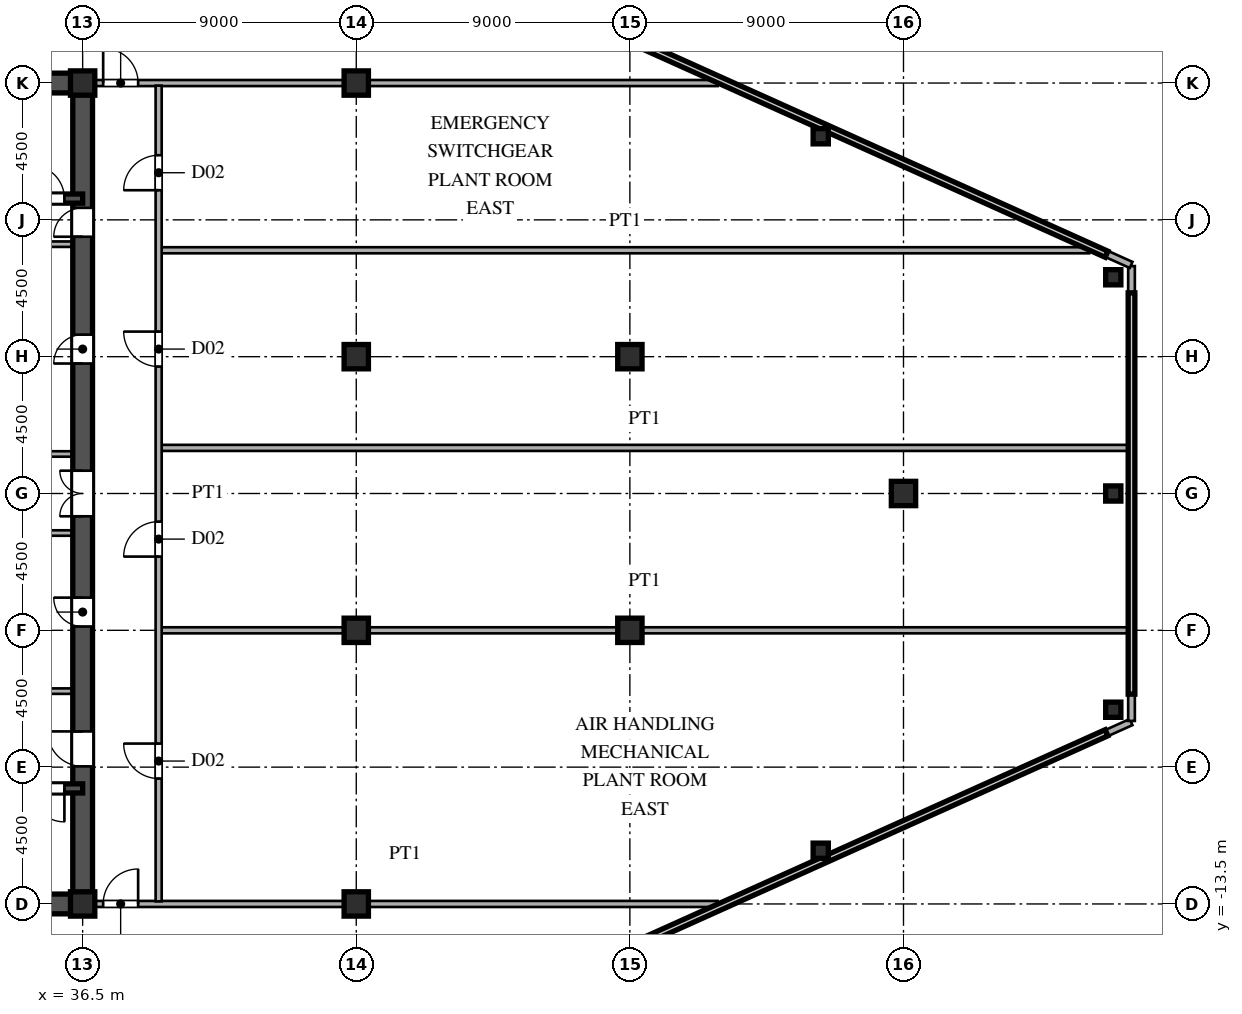
"""IFC4 building model, lengths in metres.
Left out: names, types, materials, properties, quantities, classifications, styles, units other than length and angle.
Written with IfcOpenShell. Run it as: python <this file> out.ifc"""

import sys

from ifc_helpers import new_model, si_unit, direction, frame, frame_2d, origin, origin_2d, place, context, subcontext, project, spatial, rectangle, hollow_rectangle, i_section, extrude, source, transform, mapped, element, fill, save


model = new_model("IFC4")
c1 = context("Model", 3, precision=1e-05, world=origin(), true_north=direction((0.0, 1.0)))
c2 = subcontext(c1, "Body", "Model", "MODEL_VIEW")
j1 = project(units=[si_unit("LENGTHUNIT", "METRE"), si_unit("PLANEANGLEUNIT", "RADIAN")], contexts=[c1])
p1 = place(None, origin())
s1 = spatial("IfcSite", under=j1, at=p1, CompositionType="ELEMENT")
p2 = place(p1, origin())
s2 = spatial("IfcBuilding", under=s1, at=p2, CompositionType="ELEMENT")
p3 = place(p2, frame((0.0, 0.0, 87.3)))
s3 = spatial("IfcBuildingStorey", under=s2, at=p3, CompositionType="ELEMENT", Elevation=87.3)
m1 = source(origin(), c2, "Body", "SweptSolid", [
    extrude(i_section(OverallWidth=0.8, OverallDepth=0.8, WebThickness=0.032, FlangeThickness=0.05, at=origin_2d()), origin(), (0.0, 0.0, 1.0), 5.1),
])
for number, where, z_axis, x_axis in (
    (1, (36.5, -13.5, 0.0), (0.0, 0.0, 1.0), (1.0, 0.0, 0.0)),
    (2, (36.5, 13.5, 0.0), (0.0, 0.0, 1.0), (1.0, 0.0, 0.0)),
    (3, (45.5, -13.5, 0.0), (0.0, 0.0, 1.0), (1.0, 0.0, 0.0)),
    (4, (45.5, -4.5, 0.0), (0.0, 0.0, 1.0), (1.0, 0.0, 0.0)),
    (5, (45.5, 4.5, 0.0), (0.0, 0.0, 1.0), (1.0, 0.0, 0.0)),
    (6, (45.5, 13.5, 0.0), (0.0, 0.0, 1.0), (1.0, 0.0, 0.0)),
    (7, (54.5, -4.5, 0.0), (0.0, 0.0, 1.0), (1.0, 0.0, 0.0)),
    (8, (54.5, 4.5, 0.0), (0.0, 0.0, 1.0), (1.0, 0.0, 0.0)),
    (9, (63.5, 0.0, 0.0), (0.0, 0.0, 1.0), (1.0, 0.0, 0.0)),
):
    element("IfcColumn", number, at=place(p3, frame(where, z_axis=z_axis, x_axis=x_axis)), inside=s3, PredefinedType="COLUMN", context=c2, shape_type="MappedRepresentation", body=[
        mapped(m1, transform((0.0, 0.0, 0.0), scale=1.0)),
    ])
m2 = source(origin(), c2, "Body", "SweptSolid", [
    extrude(hollow_rectangle(XDim=0.5, YDim=0.5, WallThickness=0.02, at=origin_2d()), origin(), (0.0, 0.0, 1.0), 5.1),
])
for number, where, z_axis, x_axis in (
    (10, (70.4, -7.112, 0.0), (0.0, 0.0, 1.0), (1.0, 0.0, 0.0)),
    (11, (70.4, 7.112, 0.0), (0.0, 0.0, 1.0), (1.0, 0.0, 0.0)),
    (12, (60.778, -11.749, 0.0), (0.0, 0.0, 1.0), (1.0, 0.0, 0.0)),
    (13, (60.778, 11.749, 0.0), (0.0, 0.0, 1.0), (1.0, 0.0, 0.0)),
    (14, (70.4, 0.0, 0.0), (0.0, 0.0, 1.0), (1.0, 0.0, 0.0)),
):
    element("IfcColumn", number, at=place(p3, frame(where, z_axis=z_axis, x_axis=x_axis)), inside=s3, PredefinedType="COLUMN", context=c2, shape_type="MappedRepresentation", body=[
        mapped(m2, transform((0.0, 0.0, 0.0), scale=1.0)),
    ])
p4 = place(p3, frame((31.018, -25.492, 0.0), z_axis=(0.0, 0.0, 1.0), x_axis=(0.911922547569, 0.410362360889, 0.0)))
e15 = element("IfcWall", 15, at=p4, inside=s3, PredefinedType="PARAPET", context=c2, shape_type="SweptSolid", body=[
    extrude(rectangle(XDim=43.823, YDim=0.22, at=frame_2d((21.912, 0.0))), origin(), (0.0, 0.0, 1.0), 1.25),
])
p5 = place(p3, frame((71.0, -7.48, 0.0), z_axis=(0.0, 0.0, 1.0), x_axis=(0.0, 1.0, 0.0)))
e16 = element("IfcWall", 16, at=p5, inside=s3, PredefinedType="PARAPET", context=c2, shape_type="SweptSolid", body=[
    extrude(rectangle(XDim=14.96, YDim=0.22, at=frame_2d((7.48, 0.0))), origin(), (0.0, 0.0, 1.0), 1.25),
])
p6 = place(p3, frame((70.982, 7.508, 0.0), z_axis=(0.0, 0.0, 1.0), x_axis=(-0.911922547569, 0.410362360889, 0.0)))
e17 = element("IfcWall", 17, at=p6, inside=s3, PredefinedType="PARAPET", context=c2, shape_type="SweptSolid", body=[
    extrude(rectangle(XDim=43.823, YDim=0.22, at=frame_2d((21.912, 0.0))), origin(), (0.0, 0.0, 1.0), 1.25),
])
for number, where, z_axis, x_axis in (
    (18, (27.5, -13.5, 0.0), (0.0, 0.0, 1.0), (1.0, 0.0, 0.0)),
    (19, (27.5, 13.5, 0.0), (0.0, 0.0, 1.0), (1.0, 0.0, 0.0)),
):
    element("IfcWall", number, at=place(p3, frame(where, z_axis=z_axis, x_axis=x_axis)), inside=s3, PredefinedType="SHEAR", context=c2, shape_type="SweptSolid", body=[
        extrude(rectangle(XDim=9.0, YDim=0.65, at=frame_2d((4.5, 0.0))), origin(), (0.0, 0.0, 1.0), 4.88),
    ])
p7 = place(p3, frame((36.5, -13.65, 0.0), z_axis=(0.0, 0.0, 1.0), x_axis=(0.0, 1.0, 0.0)))
e20 = element("IfcWall", 20, at=p7, inside=s3, PredefinedType="SHEAR", context=c2, shape_type="SweptSolid", body=[
    extrude(rectangle(XDim=7.15, YDim=0.65, at=frame_2d((3.575, 0.0))), origin(), (0.0, 0.0, 1.0), 4.88),
])
p8 = place(p7, frame((4.675, 0.0, 0.0)))
e21 = element("IfcOpeningElement", 21, at=p8, cuts=e20, PredefinedType="OPENING", context=c2, shape_type="SweptSolid", body=[
    extrude(rectangle(XDim=1.15, YDim=2.2, at=frame_2d((0.575, 1.1))), frame((0.0, 0.335, 0.0), z_axis=(0.0, -1.0, 0.0), x_axis=(1.0, 0.0, 0.0)), (0.0, 0.0, 1.0), 0.67),
])
p9 = place(p3, frame((36.5, -1.3, 0.0), z_axis=(0.0, 0.0, 1.0), x_axis=(0.0, 1.0, 0.0)))
e22 = element("IfcWall", 22, at=p9, inside=s3, PredefinedType="SHEAR", context=c2, shape_type="SweptSolid", body=[
    extrude(rectangle(XDim=2.6, YDim=0.65, at=frame_2d((1.3, 0.0))), origin(), (0.0, 0.0, 1.0), 4.88),
])
p10 = place(p9, frame((0.55, 0.0, 0.0)))
e23 = element("IfcOpeningElement", 23, at=p10, cuts=e22, PredefinedType="OPENING", context=c2, shape_type="SweptSolid", body=[
    extrude(rectangle(XDim=1.5, YDim=2.3, at=frame_2d((0.75, 1.15))), frame((0.0, 0.335, 0.0), z_axis=(0.0, -1.0, 0.0), x_axis=(1.0, 0.0, 0.0)), (0.0, 0.0, 1.0), 0.67),
])
p11 = place(p3, frame((36.5, 8.2, 0.0), z_axis=(0.0, 0.0, 1.0), x_axis=(0.0, 1.0, 0.0)))
e24 = element("IfcWall", 24, at=p11, inside=s3, PredefinedType="SHEAR", context=c2, shape_type="SweptSolid", body=[
    extrude(rectangle(XDim=5.45, YDim=0.65, at=frame_2d((2.725, 0.0))), origin(), (0.0, 0.0, 1.0), 4.88),
])
p12 = place(p11, frame((0.245, 0.0, 0.0)))
e25 = element("IfcOpeningElement", 25, at=p12, cuts=e24, PredefinedType="OPENING", context=c2, shape_type="SweptSolid", body=[
    extrude(rectangle(XDim=0.95, YDim=2.15, at=frame_2d((0.475, 1.075))), frame((0.0, 0.335, 0.0), z_axis=(0.0, -1.0, 0.0), x_axis=(1.0, 0.0, 0.0)), (0.0, 0.0, 1.0), 0.67),
])
p13 = place(p3, frame((36.5, -6.5, 0.0), z_axis=(0.0, 0.0, 1.0), x_axis=(0.0, 1.0, 0.0)))
e26 = element("IfcWall", 26, at=p13, inside=s3, PredefinedType="SHEAR", context=c2, shape_type="SweptSolid", body=[
    extrude(rectangle(XDim=5.2, YDim=0.65, at=frame_2d((2.6, 0.0))), origin(), (0.0, 0.0, 1.0), 4.88),
])
p14 = place(p13, frame((2.125, 0.0, 0.0)))
e27 = element("IfcOpeningElement", 27, at=p14, cuts=e26, PredefinedType="OPENING", context=c2, shape_type="SweptSolid", body=[
    extrude(rectangle(XDim=0.95, YDim=2.15, at=frame_2d((0.475, 1.075))), frame((0.0, 0.335, 0.0), z_axis=(0.0, -1.0, 0.0), x_axis=(1.0, 0.0, 0.0)), (0.0, 0.0, 1.0), 0.67),
])
p15 = place(p3, frame((36.5, 1.3, 0.0), z_axis=(0.0, 0.0, 1.0), x_axis=(0.0, 1.0, 0.0)))
e28 = element("IfcWall", 28, at=p15, inside=s3, PredefinedType="SHEAR", context=c2, shape_type="SweptSolid", body=[
    extrude(rectangle(XDim=6.9, YDim=0.65, at=frame_2d((3.45, 0.0))), origin(), (0.0, 0.0, 1.0), 4.88),
])
p16 = place(p15, frame((2.975, 0.0, 0.0)))
e29 = element("IfcOpeningElement", 29, at=p16, cuts=e28, PredefinedType="OPENING", context=c2, shape_type="SweptSolid", body=[
    extrude(rectangle(XDim=0.95, YDim=2.15, at=frame_2d((0.475, 1.075))), frame((0.0, 0.335, 0.0), z_axis=(0.0, -1.0, 0.0), x_axis=(1.0, 0.0, 0.0)), (0.0, 0.0, 1.0), 0.67),
])
p17 = place(p3, frame((27.5, -9.7, 0.0), z_axis=(0.0, 0.0, 1.0), x_axis=(1.0, 0.0, 0.0)))
e30 = element("IfcWall", 30, at=p17, inside=s3, PredefinedType="SHEAR", context=c2, shape_type="SweptSolid", body=[
    extrude(rectangle(XDim=9.0, YDim=0.3, at=frame_2d((4.5, 0.0))), origin(), (0.0, 0.0, 1.0), 4.88),
])
p18 = place(p17, frame((7.3, 0.0, 0.0)))
e31 = element("IfcOpeningElement", 31, at=p18, cuts=e30, PredefinedType="OPENING", context=c2, shape_type="SweptSolid", body=[
    extrude(rectangle(XDim=1.1, YDim=2.2, at=frame_2d((0.55, 1.1))), frame((0.0, 0.16, 0.0), z_axis=(0.0, -1.0, 0.0), x_axis=(1.0, 0.0, 0.0)), (0.0, 0.0, 1.0), 0.32),
])
p19 = place(p3, frame((27.5, 9.7, 0.0), z_axis=(0.0, 0.0, 1.0), x_axis=(1.0, 0.0, 0.0)))
e32 = element("IfcWall", 32, at=p19, inside=s3, PredefinedType="SHEAR", context=c2, shape_type="SweptSolid", body=[
    extrude(rectangle(XDim=9.0, YDim=0.3, at=frame_2d((4.5, 0.0))), origin(), (0.0, 0.0, 1.0), 4.88),
])
p20 = place(p19, frame((7.3, 0.0, 0.0)))
e33 = element("IfcOpeningElement", 33, at=p20, cuts=e32, PredefinedType="OPENING", context=c2, shape_type="SweptSolid", body=[
    extrude(rectangle(XDim=1.1, YDim=2.2, at=frame_2d((0.55, 1.1))), frame((0.0, 0.16, 0.0), z_axis=(0.0, -1.0, 0.0), x_axis=(1.0, 0.0, 0.0)), (0.0, 0.0, 1.0), 0.32),
])
for number, where, z_axis, x_axis in (
    (34, (30.45, -6.5, 0.0), (0.0, 0.0, 1.0), (1.0, 0.0, 0.0)),
    (35, (30.45, 8.2, 0.0), (0.0, 0.0, 1.0), (1.0, 0.0, 0.0)),
):
    element("IfcWall", number, at=place(p3, frame(where, z_axis=z_axis, x_axis=x_axis)), inside=s3, PredefinedType="PARTITIONING", context=c2, shape_type="SweptSolid", body=[
        extrude(rectangle(XDim=5.7, YDim=0.18, at=frame_2d((2.85, 0.0))), origin(), (0.0, 0.0, 1.0), 4.88),
    ])
for number, where, z_axis, x_axis in (
    (36, (33.2, -1.3, 0.0), (0.0, 0.0, 1.0), (1.0, 0.0, 0.0)),
    (37, (33.2, 1.3, 0.0), (0.0, 0.0, 1.0), (1.0, 0.0, 0.0)),
):
    element("IfcWall", number, at=place(p3, frame(where, z_axis=z_axis, x_axis=x_axis)), inside=s3, PredefinedType="PARTITIONING", context=c2, shape_type="SweptSolid", body=[
        extrude(rectangle(XDim=2.95, YDim=0.18, at=frame_2d((1.475, 0.0))), origin(), (0.0, 0.0, 1.0), 4.88),
    ])
p21 = place(p3, frame((36.83, -13.5, 0.0), z_axis=(0.0, 0.0, 1.0), x_axis=(1.0, 0.0, 0.0)))
e38 = element("IfcWall", 38, at=p21, inside=s3, PredefinedType="PARTITIONING", context=c2, shape_type="SweptSolid", body=[
    extrude(rectangle(XDim=8.69, YDim=0.2, at=frame_2d((4.345, 0.0))), origin(), (0.0, 0.0, 1.0), 4.18),
])
p22 = place(p21, frame((0.345, 0.0, 0.0)))
e39 = element("IfcOpeningElement", 39, at=p22, cuts=e38, PredefinedType="OPENING", context=c2, shape_type="SweptSolid", body=[
    extrude(rectangle(XDim=1.15, YDim=2.2, at=frame_2d((0.575, 1.1))), frame((0.0, 0.11, 0.0), z_axis=(0.0, -1.0, 0.0), x_axis=(1.0, 0.0, 0.0)), (0.0, 0.0, 1.0), 0.22),
])
p23 = place(p3, frame((45.52, -13.5, 0.0), z_axis=(0.0, 0.0, 1.0), x_axis=(1.0, 0.0, 0.0)))
e40 = element("IfcWall", 40, at=p23, inside=s3, PredefinedType="PARTITIONING", context=c2, shape_type="SweptSolid", body=[
    extrude(rectangle(XDim=11.866, YDim=0.2, at=frame_2d((5.933, 0.0))), origin(), (0.0, 0.0, 1.0), 4.88),
])
p24 = place(p3, frame((39.085, -4.5, 0.0), z_axis=(0.0, 0.0, 1.0), x_axis=(1.0, 0.0, 0.0)))
e41 = element("IfcWall", 41, at=p24, inside=s3, PredefinedType="PARTITIONING", context=c2, shape_type="SweptSolid", body=[
    extrude(rectangle(XDim=15.435, YDim=0.2, at=frame_2d((7.718, 0.0))), origin(), (0.0, 0.0, 1.0), 4.18),
])
p25 = place(p3, frame((54.52, -4.5, 0.0), z_axis=(0.0, 0.0, 1.0), x_axis=(1.0, 0.0, 0.0)))
e42 = element("IfcWall", 42, at=p25, inside=s3, PredefinedType="PARTITIONING", context=c2, shape_type="SweptSolid", body=[
    extrude(rectangle(XDim=16.365, YDim=0.2, at=frame_2d((8.183, 0.0))), origin(), (0.0, 0.0, 1.0), 4.88),
])
p26 = place(p3, frame((39.085, 1.5, 0.0), z_axis=(0.0, 0.0, 1.0), x_axis=(1.0, 0.0, 0.0)))
e43 = element("IfcWall", 43, at=p26, inside=s3, PredefinedType="PARTITIONING", context=c2, shape_type="SweptSolid", body=[
    extrude(rectangle(XDim=31.8, YDim=0.2, at=frame_2d((15.9, 0.0))), origin(), (0.0, 0.0, 1.0), 4.88),
])
p27 = place(p3, frame((39.085, 8.0, 0.0), z_axis=(0.0, 0.0, 1.0), x_axis=(1.0, 0.0, 0.0)))
e44 = element("IfcWall", 44, at=p27, inside=s3, PredefinedType="PARTITIONING", context=c2, shape_type="SweptSolid", body=[
    extrude(rectangle(XDim=30.524, YDim=0.2, at=frame_2d((15.262, 0.0))), origin(), (0.0, 0.0, 1.0), 4.88),
])
p28 = place(p3, frame((36.83, 13.5, 0.0), z_axis=(0.0, 0.0, 1.0), x_axis=(1.0, 0.0, 0.0)))
e45 = element("IfcWall", 45, at=p28, inside=s3, PredefinedType="PARTITIONING", context=c2, shape_type="SweptSolid", body=[
    extrude(rectangle(XDim=8.69, YDim=0.2, at=frame_2d((4.345, 0.0))), origin(), (0.0, 0.0, 1.0), 4.18),
])
p29 = place(p28, frame((0.345, 0.0, 0.0)))
e46 = element("IfcOpeningElement", 46, at=p29, cuts=e45, PredefinedType="OPENING", context=c2, shape_type="SweptSolid", body=[
    extrude(rectangle(XDim=1.15, YDim=2.2, at=frame_2d((0.575, 1.1))), frame((0.0, 0.11, 0.0), z_axis=(0.0, -1.0, 0.0), x_axis=(1.0, 0.0, 0.0)), (0.0, 0.0, 1.0), 0.22),
])
p30 = place(p3, frame((45.52, 13.5, 0.0), z_axis=(0.0, 0.0, 1.0), x_axis=(1.0, 0.0, 0.0)))
e47 = element("IfcWall", 47, at=p30, inside=s3, PredefinedType="PARTITIONING", context=c2, shape_type="SweptSolid", body=[
    extrude(rectangle(XDim=11.866, YDim=0.2, at=frame_2d((5.933, 0.0))), origin(), (0.0, 0.0, 1.0), 4.88),
])
p31 = place(p3, frame((39.0, -13.415, 0.0), z_axis=(0.0, 0.0, 1.0), x_axis=(0.0, 1.0, 0.0)))
e48 = element("IfcWall", 48, at=p31, inside=s3, PredefinedType="PARTITIONING", context=c2, shape_type="SweptSolid", body=[
    extrude(rectangle(XDim=26.83, YDim=0.2, at=frame_2d((13.415, 0.0))), origin(), (0.0, 0.0, 1.0), 4.88),
])
p32 = place(p31, frame((4.04, 0.0, 0.0)))
e49 = element("IfcOpeningElement", 49, at=p32, cuts=e48, PredefinedType="OPENING", context=c2, shape_type="SweptSolid", body=[
    extrude(rectangle(XDim=1.15, YDim=2.2, at=frame_2d((0.575, 1.1))), frame((0.0, 0.11, 0.0), z_axis=(0.0, -1.0, 0.0), x_axis=(1.0, 0.0, 0.0)), (0.0, 0.0, 1.0), 0.22),
])
p33 = place(p31, frame((11.34, 0.0, 0.0)))
e50 = element("IfcOpeningElement", 50, at=p33, cuts=e48, PredefinedType="OPENING", context=c2, shape_type="SweptSolid", body=[
    extrude(rectangle(XDim=1.15, YDim=2.2, at=frame_2d((0.575, 1.1))), frame((0.0, 0.11, 0.0), z_axis=(0.0, -1.0, 0.0), x_axis=(1.0, 0.0, 0.0)), (0.0, 0.0, 1.0), 0.22),
])
p34 = place(p31, frame((17.59, 0.0, 0.0)))
e51 = element("IfcOpeningElement", 51, at=p34, cuts=e48, PredefinedType="OPENING", context=c2, shape_type="SweptSolid", body=[
    extrude(rectangle(XDim=1.15, YDim=2.2, at=frame_2d((0.575, 1.1))), frame((0.0, 0.11, 0.0), z_axis=(0.0, -1.0, 0.0), x_axis=(1.0, 0.0, 0.0)), (0.0, 0.0, 1.0), 0.22),
])
p35 = place(p31, frame((23.39, 0.0, 0.0)))
e52 = element("IfcOpeningElement", 52, at=p35, cuts=e48, PredefinedType="OPENING", context=c2, shape_type="SweptSolid", body=[
    extrude(rectangle(XDim=1.15, YDim=2.2, at=frame_2d((0.575, 1.1))), frame((0.0, 0.11, 0.0), z_axis=(0.0, -1.0, 0.0), x_axis=(1.0, 0.0, 0.0)), (0.0, 0.0, 1.0), 0.22),
])
m3 = source(origin(), c2, "Body", "SweptSolid", [
    extrude(rectangle(XDim=1.15, YDim=2.2, at=frame_2d((0.575, 1.1))), frame((0.0, 0.025, 0.0), z_axis=(0.0, -1.0, 0.0), x_axis=(1.0, 0.0, 0.0)), (0.0, 0.0, 1.0), 0.05),
])
p36 = place(p8, origin())
e53 = element("IfcDoor", 53, at=p36, inside=s3, OperationType="SINGLE_SWING_RIGHT", PredefinedType="DOOR", context=c2, shape_type="MappedRepresentation", body=[
    mapped(m3, transform((0.0, 0.0, 0.0), scale=1.0)),
])
fill(e21, e53)
m4 = source(origin(), c2, "Body", "SweptSolid", [
    extrude(rectangle(XDim=1.5, YDim=2.3, at=frame_2d((0.75, 1.15))), frame((0.0, 0.025, 0.0), z_axis=(0.0, -1.0, 0.0), x_axis=(1.0, 0.0, 0.0)), (0.0, 0.0, 1.0), 0.05),
])
p37 = place(p10, origin())
e54 = element("IfcDoor", 54, at=p37, inside=s3, OperationType="DOUBLE_SWING_LEFT", PredefinedType="DOOR", context=c2, shape_type="MappedRepresentation", body=[
    mapped(m4, transform((0.0, 0.0, 0.0), scale=1.0)),
])
fill(e23, e54)
m5 = source(origin(), c2, "Body", "SweptSolid", [
    extrude(rectangle(XDim=0.95, YDim=2.15, at=frame_2d((0.475, 1.075))), frame((0.0, 0.025, 0.0), z_axis=(0.0, -1.0, 0.0), x_axis=(1.0, 0.0, 0.0)), (0.0, 0.0, 1.0), 0.05),
])
p38 = place(p12, origin())
e55 = element("IfcDoor", 55, at=p38, inside=s3, OperationType="SINGLE_SWING_LEFT", PredefinedType="DOOR", context=c2, shape_type="MappedRepresentation", body=[
    mapped(m5, transform((0.0, 0.0, 0.0), scale=1.0)),
])
fill(e25, e55)
p39 = place(p14, origin())
e56 = element("IfcDoor", 56, at=p39, inside=s3, OperationType="SINGLE_SWING_RIGHT", PredefinedType="DOOR", context=c2, shape_type="MappedRepresentation", body=[
    mapped(m5, transform((0.0, 0.0, 0.0), scale=1.0)),
])
fill(e27, e56)
p40 = place(p16, origin())
e57 = element("IfcDoor", 57, at=p40, inside=s3, OperationType="SINGLE_SWING_LEFT", PredefinedType="DOOR", context=c2, shape_type="MappedRepresentation", body=[
    mapped(m5, transform((0.0, 0.0, 0.0), scale=1.0)),
])
fill(e29, e57)
m6 = source(origin(), c2, "Body", "SweptSolid", [
    extrude(rectangle(XDim=1.1, YDim=2.2, at=frame_2d((0.55, 1.1))), frame((0.0, 0.025, 0.0), z_axis=(0.0, -1.0, 0.0), x_axis=(1.0, 0.0, 0.0)), (0.0, 0.0, 1.0), 0.05),
])
p41 = place(p18, frame((1.1, 0.0, 0.0), z_axis=(0.0, 0.0, 1.0), x_axis=(-1.0, 0.0, 0.0)))
e58 = element("IfcDoor", 58, at=p41, inside=s3, OperationType="SINGLE_SWING_RIGHT", PredefinedType="DOOR", context=c2, shape_type="MappedRepresentation", body=[
    mapped(m6, transform((0.0, 0.0, 0.0), scale=1.0)),
])
fill(e31, e58)
p42 = place(p20, origin())
e59 = element("IfcDoor", 59, at=p42, inside=s3, OperationType="SINGLE_SWING_LEFT", PredefinedType="DOOR", context=c2, shape_type="MappedRepresentation", body=[
    mapped(m6, transform((0.0, 0.0, 0.0), scale=1.0)),
])
fill(e33, e59)
p43 = place(p22, origin())
e60 = element("IfcDoor", 60, at=p43, inside=s3, OperationType="SINGLE_SWING_RIGHT", PredefinedType="DOOR", context=c2, shape_type="MappedRepresentation", body=[
    mapped(m3, transform((0.0, 0.0, 0.0), scale=1.0)),
])
fill(e39, e60)
p44 = place(p29, origin())
e61 = element("IfcDoor", 61, at=p44, inside=s3, OperationType="SINGLE_SWING_LEFT", PredefinedType="DOOR", context=c2, shape_type="MappedRepresentation", body=[
    mapped(m3, transform((0.0, 0.0, 0.0), scale=1.0)),
])
fill(e46, e61)
p45 = place(p32, origin())
e62 = element("IfcDoor", 62, at=p45, inside=s3, OperationType="SINGLE_SWING_RIGHT", PredefinedType="DOOR", context=c2, shape_type="MappedRepresentation", body=[
    mapped(m3, transform((0.0, 0.0, 0.0), scale=1.0)),
])
fill(e49, e62)
p46 = place(p33, origin())
e63 = element("IfcDoor", 63, at=p46, inside=s3, OperationType="SINGLE_SWING_LEFT", PredefinedType="DOOR", context=c2, shape_type="MappedRepresentation", body=[
    mapped(m3, transform((0.0, 0.0, 0.0), scale=1.0)),
])
fill(e50, e63)
p47 = place(p34, origin())
e64 = element("IfcDoor", 64, at=p47, inside=s3, OperationType="SINGLE_SWING_RIGHT", PredefinedType="DOOR", context=c2, shape_type="MappedRepresentation", body=[
    mapped(m3, transform((0.0, 0.0, 0.0), scale=1.0)),
])
fill(e51, e64)
p48 = place(p35, origin())
e65 = element("IfcDoor", 65, at=p48, inside=s3, OperationType="SINGLE_SWING_LEFT", PredefinedType="DOOR", context=c2, shape_type="MappedRepresentation", body=[
    mapped(m3, transform((0.0, 0.0, 0.0), scale=1.0)),
])
fill(e52, e65)
save(model, sys.argv[1])
